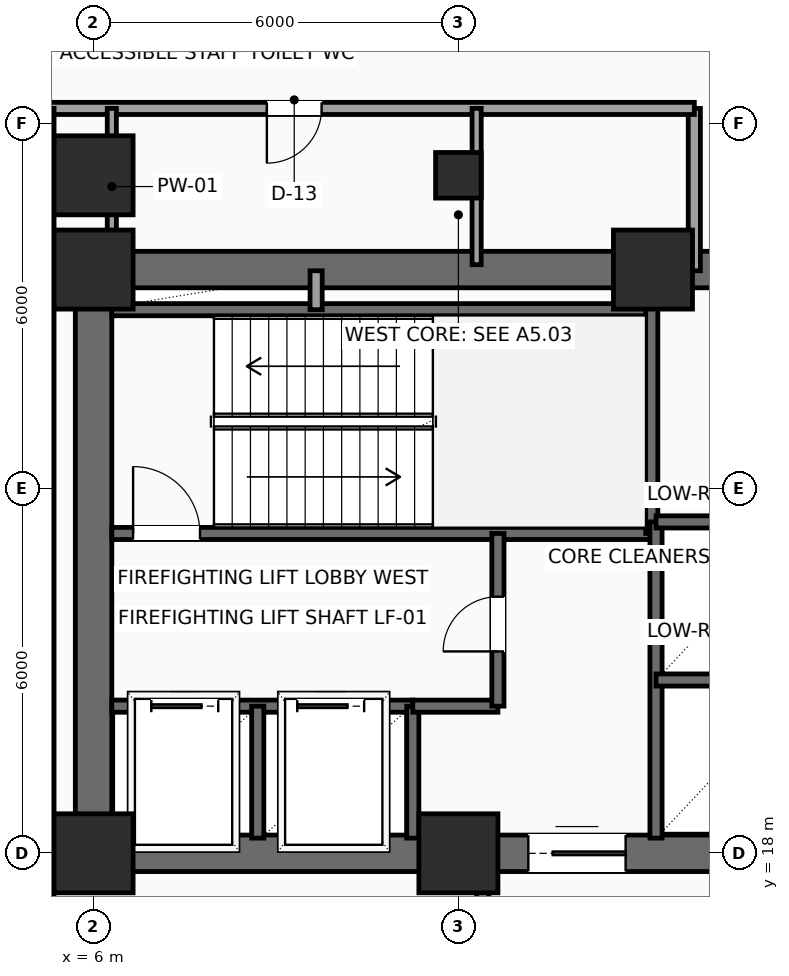
"""IFC4 building model, lengths in metres.
Left out: names, types, materials, properties, quantities, classifications, styles, units other than length and angle.
Written with IfcOpenShell. Run it as: python <this file> out.ifc"""

import sys

from ifc_helpers import new_model, si_unit, direction, frame, frame_2d, origin, origin_2d, place, context, subcontext, project, spatial, rectangle, hollow_rectangle, extrude, element, fill, save


model = new_model("IFC4")
c1 = context("Model", 3, precision=1e-05, world=origin(), true_north=direction((0.0, 1.0)))
c2 = subcontext(c1, "Body", "Model", "MODEL_VIEW")
j1 = project(units=[si_unit("LENGTHUNIT", "METRE"), si_unit("PLANEANGLEUNIT", "RADIAN")], contexts=[c1])
p1 = place(None, origin())
s1 = spatial("IfcSite", under=j1, at=p1, CompositionType="ELEMENT")
p2 = place(p1, origin())
s2 = spatial("IfcBuilding", under=s1, at=p2, CompositionType="ELEMENT")
p3 = place(p2, frame((0.0, 0.0, 55.8)))
s3 = spatial("IfcBuildingStorey", under=s2, at=p3, CompositionType="ELEMENT", Elevation=55.8)
for number, where, z_axis, x_axis in (
    (1, (6.0, 18.0, 0.0), (0.0, 0.0, 1.0), (1.0, 0.0, 0.0)),
    (2, (12.0, 18.0, 0.0), (0.0, 0.0, 1.0), (1.0, 0.0, 0.0)),
    (3, (6.0, 27.6, 0.0), (0.0, 0.0, 1.0), (1.0, 0.0, 0.0)),
    (4, (15.2, 27.6, 0.0), (0.0, 0.0, 1.0), (1.0, 0.0, 0.0)),
    (5, (6.0, 29.15, 0.0), (0.0, 0.0, 1.0), (1.0, 0.0, 0.0)),
):
    element("IfcColumn", number, at=place(p3, frame(where, z_axis=z_axis, x_axis=x_axis)), inside=s3, PredefinedType="COLUMN", context=c2, shape_type="SweptSolid", body=[
        extrude(rectangle(XDim=1.3, YDim=1.3, at=origin_2d()), origin(), (0.0, 0.0, 1.0), 3.9),
    ])
p4 = place(p3, frame((12.0, 29.15, 0.0), z_axis=(0.0, 0.0, 1.0), x_axis=(1.0, 0.0, 0.0)))
e6 = element("IfcColumn", 6, at=p4, inside=s3, PredefinedType="COLUMN", context=c2, shape_type="SweptSolid", body=[
    extrude(hollow_rectangle(XDim=0.75, YDim=0.75, WallThickness=0.035, InnerFilletRadius=0.035, OuterFilletRadius=0.05, at=origin_2d()), origin(), (0.0, 0.0, 1.0), 3.9),
])
p5 = place(p3, frame((6.0, 18.0, 0.0), z_axis=(0.0, 0.0, 1.0), x_axis=(1.0, 0.0, 0.0)))
e7 = element("IfcWall", 7, at=p5, inside=s3, PredefinedType="SHEAR", context=c2, shape_type="SweptSolid", body=[
    extrude(rectangle(XDim=12.0, YDim=0.6, at=frame_2d((6.0, 0.0))), origin(), (0.0, 0.0, 1.0), 3.65),
])
p6 = place(p5, frame((7.15, 0.0, 0.0)))
e8 = element("IfcOpeningElement", 8, at=p6, cuts=e7, PredefinedType="OPENING", context=c2, shape_type="SweptSolid", body=[
    extrude(rectangle(XDim=1.6, YDim=2.3, at=frame_2d((0.8, 1.15))), frame((0.0, 0.31, 0.0), z_axis=(0.0, -1.0, 0.0), x_axis=(1.0, 0.0, 0.0)), (0.0, 0.0, 1.0), 0.62),
])
p7 = place(p3, frame((6.0, 27.6, 0.0), z_axis=(0.0, 0.0, 1.0), x_axis=(1.0, 0.0, 0.0)))
e9 = element("IfcWall", 9, at=p7, inside=s3, PredefinedType="SHEAR", context=c2, shape_type="SweptSolid", body=[
    extrude(rectangle(XDim=12.0, YDim=0.6, at=frame_2d((6.0, 0.0))), origin(), (0.0, 0.0, 1.0), 3.65),
])
p8 = place(p7, frame((10.2, 0.0, 0.0)))
e10 = element("IfcOpeningElement", 10, at=p8, cuts=e9, PredefinedType="OPENING", context=c2, shape_type="SweptSolid", body=[
    extrude(rectangle(XDim=0.9, YDim=2.15, at=frame_2d((0.45, 1.075))), frame((0.0, 0.31, 0.0), z_axis=(0.0, -1.0, 0.0), x_axis=(1.0, 0.0, 0.0)), (0.0, 0.0, 1.0), 0.62),
])
p9 = place(p3, frame((6.0, 18.0, 0.0), z_axis=(0.0, 0.0, 1.0), x_axis=(0.0, 1.0, 0.0)))
e11 = element("IfcWall", 11, at=p9, inside=s3, PredefinedType="SHEAR", context=c2, shape_type="SweptSolid", body=[
    extrude(rectangle(XDim=9.6, YDim=0.6, at=frame_2d((4.8, 0.0))), origin(), (0.0, 0.0, 1.0), 3.65),
])
p10 = place(p3, frame((6.3, 23.26, 0.0), z_axis=(0.0, 0.0, 1.0), x_axis=(1.0, 0.0, 0.0)))
e12 = element("IfcWall", 12, at=p10, inside=s3, PredefinedType="SHEAR", context=c2, shape_type="SweptSolid", body=[
    extrude(rectangle(XDim=8.88, YDim=0.2, at=frame_2d((4.44, 0.0))), origin(), (0.0, 0.0, 1.0), 3.65),
])
p11 = place(p10, frame((0.35, 0.0, 0.0)))
e13 = element("IfcOpeningElement", 13, at=p11, cuts=e12, PredefinedType="OPENING", context=c2, shape_type="SweptSolid", body=[
    extrude(rectangle(XDim=1.1, YDim=2.2, at=frame_2d((0.55, 1.1))), frame((0.0, 0.11, 0.0), z_axis=(0.0, -1.0, 0.0), x_axis=(1.0, 0.0, 0.0)), (0.0, 0.0, 1.0), 0.22),
])
p12 = place(p3, frame((6.3, 26.94, 0.0), z_axis=(0.0, 0.0, 1.0), x_axis=(1.0, 0.0, 0.0)))
e14 = element("IfcWall", 14, at=p12, inside=s3, PredefinedType="SHEAR", context=c2, shape_type="SweptSolid", body=[
    extrude(rectangle(XDim=8.88, YDim=0.2, at=frame_2d((4.44, 0.0))), origin(), (0.0, 0.0, 1.0), 3.65),
])
p13 = place(p3, frame((15.18, 23.26, 0.0), z_axis=(0.0, 0.0, 1.0), x_axis=(0.0, 1.0, 0.0)))
e15 = element("IfcWall", 15, at=p13, inside=s3, PredefinedType="SHEAR", context=c2, shape_type="SweptSolid", body=[
    extrude(rectangle(XDim=4.04, YDim=0.2, at=frame_2d((2.02, 0.0))), origin(), (0.0, 0.0, 1.0), 3.65),
])
p14 = place(p3, frame((6.3, 20.42, 0.0), z_axis=(0.0, 0.0, 1.0), x_axis=(1.0, 0.0, 0.0)))
e16 = element("IfcWall", 16, at=p14, inside=s3, PredefinedType="SHEAR", context=c2, shape_type="SweptSolid", body=[
    extrude(rectangle(XDim=4.95, YDim=0.2, at=frame_2d((2.475, 0.0))), origin(), (0.0, 0.0, 1.0), 3.65),
])
p15 = place(p14, frame((0.65, 0.0, 0.0)))
e17 = element("IfcOpeningElement", 17, at=p15, cuts=e16, PredefinedType="OPENING", context=c2, shape_type="SweptSolid", body=[
    extrude(rectangle(XDim=1.1, YDim=2.2, at=frame_2d((0.55, 1.1))), frame((0.0, 0.11, 0.0), z_axis=(0.0, -1.0, 0.0), x_axis=(1.0, 0.0, 0.0)), (0.0, 0.0, 1.0), 0.22),
])
p16 = place(p14, frame((3.05, 0.0, 0.0)))
e18 = element("IfcOpeningElement", 18, at=p16, cuts=e16, PredefinedType="OPENING", context=c2, shape_type="SweptSolid", body=[
    extrude(rectangle(XDim=1.1, YDim=2.2, at=frame_2d((0.55, 1.1))), frame((0.0, 0.11, 0.0), z_axis=(0.0, -1.0, 0.0), x_axis=(1.0, 0.0, 0.0)), (0.0, 0.0, 1.0), 0.22),
])
for number, where, z_axis, x_axis in (
    (19, (8.7, 18.25, 0.0), (0.0, 0.0, 1.0), (0.0, 1.0, 0.0)),
    (20, (11.25, 18.25, 0.0), (0.0, 0.0, 1.0), (0.0, 1.0, 0.0)),
):
    element("IfcWall", number, at=place(p3, frame(where, z_axis=z_axis, x_axis=x_axis)), inside=s3, PredefinedType="SHEAR", context=c2, shape_type="SweptSolid", body=[
        extrude(rectangle(XDim=2.17, YDim=0.2, at=frame_2d((1.085, 0.0))), origin(), (0.0, 0.0, 1.0), 3.65),
    ])
p17 = place(p3, frame((11.25, 20.42, 0.0), z_axis=(0.0, 0.0, 1.0), x_axis=(1.0, 0.0, 0.0)))
e21 = element("IfcWall", 21, at=p17, inside=s3, PredefinedType="SHEAR", context=c2, shape_type="SweptSolid", body=[
    extrude(rectangle(XDim=1.4, YDim=0.2, at=frame_2d((0.7, 0.0))), origin(), (0.0, 0.0, 1.0), 3.65),
])
p18 = place(p3, frame((12.65, 20.42, 0.0), z_axis=(0.0, 0.0, 1.0), x_axis=(0.0, 1.0, 0.0)))
e22 = element("IfcWall", 22, at=p18, inside=s3, PredefinedType="SHEAR", context=c2, shape_type="SweptSolid", body=[
    extrude(rectangle(XDim=2.84, YDim=0.2, at=frame_2d((1.42, 0.0))), origin(), (0.0, 0.0, 1.0), 3.65),
])
p19 = place(p18, frame((0.9, 0.0, 0.0)))
e23 = element("IfcOpeningElement", 23, at=p19, cuts=e22, PredefinedType="OPENING", context=c2, shape_type="SweptSolid", body=[
    extrude(rectangle(XDim=0.9, YDim=2.15, at=frame_2d((0.45, 1.075))), frame((0.0, 0.11, 0.0), z_axis=(0.0, -1.0, 0.0), x_axis=(1.0, 0.0, 0.0)), (0.0, 0.0, 1.0), 0.22),
])
p20 = place(p3, frame((9.66, 26.94, 0.0), z_axis=(0.0, 0.0, 1.0), x_axis=(0.0, 1.0, 0.0)))
e24 = element("IfcWall", 24, at=p20, inside=s3, PredefinedType="SOLIDWALL", context=c2, shape_type="SweptSolid", body=[
    extrude(rectangle(XDim=0.64, YDim=0.2, at=frame_2d((0.32, 0.0))), origin(), (0.0, 0.0, 1.0), 3.65),
])
p21 = place(p3, frame((15.25, 18.25, 0.0), z_axis=(0.0, 0.0, 1.0), x_axis=(0.0, 1.0, 0.0)))
e25 = element("IfcWall", 25, at=p21, inside=s3, PredefinedType="SHEAR", context=c2, shape_type="SweptSolid", body=[
    extrude(rectangle(XDim=5.2, YDim=0.2, at=frame_2d((2.6, 0.0))), origin(), (0.0, 0.0, 1.0), 3.65),
])
p22 = place(p3, frame((15.25, 20.85, 0.0), z_axis=(0.0, 0.0, 1.0), x_axis=(1.0, 0.0, 0.0)))
e26 = element("IfcWall", 26, at=p22, inside=s3, PredefinedType="SHEAR", context=c2, shape_type="SweptSolid", body=[
    extrude(rectangle(XDim=2.4, YDim=0.2, at=frame_2d((1.2, 0.0))), origin(), (0.0, 0.0, 1.0), 3.65),
])
p23 = place(p3, frame((15.25, 23.45, 0.0), z_axis=(0.0, 0.0, 1.0), x_axis=(1.0, 0.0, 0.0)))
e27 = element("IfcWall", 27, at=p23, inside=s3, PredefinedType="SHEAR", context=c2, shape_type="SweptSolid", body=[
    extrude(rectangle(XDim=2.45, YDim=0.2, at=frame_2d((1.225, 0.0))), origin(), (0.0, 0.0, 1.0), 3.65),
])
p24 = place(p3, frame((15.88, 27.58, 0.0), z_axis=(0.0, 0.0, 1.0), x_axis=(0.0, 1.0, 0.0)))
e28 = element("IfcWall", 28, at=p24, inside=s3, PredefinedType="SOLIDWALL", context=c2, shape_type="SweptSolid", body=[
    extrude(rectangle(XDim=2.67, YDim=0.2, at=frame_2d((1.335, 0.0))), origin(), (0.0, 0.0, 1.0), 3.65),
])
p25 = place(p3, frame((15.88, 30.25, 0.0), z_axis=(0.0, 0.0, 1.0), x_axis=(-1.0, 0.0, 0.0)))
e29 = element("IfcWall", 29, at=p25, inside=s3, PredefinedType="SOLIDWALL", context=c2, shape_type="SweptSolid", body=[
    extrude(rectangle(XDim=10.63, YDim=0.2, at=frame_2d((5.315, 0.0))), origin(), (0.0, 0.0, 1.0), 3.65),
])
p26 = place(p25, frame((6.13, 0.0, 0.0)))
e30 = element("IfcOpeningElement", 30, at=p26, cuts=e29, PredefinedType="OPENING", context=c2, shape_type="SweptSolid", body=[
    extrude(rectangle(XDim=0.9, YDim=2.1, at=frame_2d((0.45, 1.05))), frame((0.0, 0.11, 0.0), z_axis=(0.0, -1.0, 0.0), x_axis=(1.0, 0.0, 0.0)), (0.0, 0.0, 1.0), 0.22),
])
p27 = place(p3, frame((5.25, 30.25, 0.0), z_axis=(0.0, 0.0, 1.0), x_axis=(0.0, -1.0, 0.0)))
e31 = element("IfcWall", 31, at=p27, inside=s3, PredefinedType="SOLIDWALL", context=c2, shape_type="SweptSolid", body=[
    extrude(rectangle(XDim=14.1, YDim=0.2, at=frame_2d((7.05, 0.0))), origin(), (0.0, 0.0, 1.0), 3.65),
])
p28 = place(p3, frame((12.4, 16.15, 0.0), z_axis=(0.0, 0.0, 1.0), x_axis=(0.0, 1.0, 0.0)))
e32 = element("IfcWall", 32, at=p28, inside=s3, PredefinedType="SOLIDWALL", context=c2, shape_type="SweptSolid", body=[
    extrude(rectangle(XDim=1.8, YDim=0.2, at=frame_2d((0.9, 0.0))), origin(), (0.0, 0.0, 1.0), 3.65),
])
for number, where, z_axis, x_axis in (
    (33, (6.3, 27.68, 0.0), (0.0, 0.0, 1.0), (0.0, 1.0, 0.0)),
    (34, (12.3, 27.68, 0.0), (0.0, 0.0, 1.0), (0.0, 1.0, 0.0)),
):
    element("IfcWall", number, at=place(p3, frame(where, z_axis=z_axis, x_axis=x_axis)), inside=s3, PredefinedType="PARTITIONING", context=c2, shape_type="SweptSolid", body=[
        extrude(rectangle(XDim=2.57, YDim=0.15, at=frame_2d((1.285, 0.0))), origin(), (0.0, 0.0, 1.0), 2.992),
    ])
p29 = place(p6, origin())
e35 = element("IfcDoor", 35, at=p29, inside=s3, OperationType="DOUBLE_DOOR_SLIDING", PredefinedType="DOOR", context=c2, shape_type="SweptSolid", body=[
    extrude(rectangle(XDim=1.6, YDim=2.3, at=frame_2d((0.8, 1.15))), frame((0.0, 0.025, 0.0), z_axis=(0.0, -1.0, 0.0), x_axis=(1.0, 0.0, 0.0)), (0.0, 0.0, 1.0), 0.05),
])
fill(e8, e35)
p30 = place(p11, origin())
e36 = element("IfcDoor", 36, at=p30, inside=s3, OperationType="SINGLE_SWING_LEFT", PredefinedType="DOOR", context=c2, shape_type="SweptSolid", body=[
    extrude(rectangle(XDim=1.1, YDim=2.2, at=frame_2d((0.55, 1.1))), frame((0.0, 0.025, 0.0), z_axis=(0.0, -1.0, 0.0), x_axis=(1.0, 0.0, 0.0)), (0.0, 0.0, 1.0), 0.05),
])
fill(e13, e36)
p31 = place(p15, origin())
e37 = element("IfcDoor", 37, at=p31, inside=s3, OperationType="SLIDING_TO_LEFT", PredefinedType="DOOR", context=c2, shape_type="SweptSolid", body=[
    extrude(rectangle(XDim=1.1, YDim=2.2, at=frame_2d((0.55, 1.1))), frame((0.0, 0.025, 0.0), z_axis=(0.0, -1.0, 0.0), x_axis=(1.0, 0.0, 0.0)), (0.0, 0.0, 1.0), 0.05),
])
fill(e17, e37)
p32 = place(p16, origin())
e38 = element("IfcDoor", 38, at=p32, inside=s3, OperationType="SLIDING_TO_LEFT", PredefinedType="DOOR", context=c2, shape_type="SweptSolid", body=[
    extrude(rectangle(XDim=1.1, YDim=2.2, at=frame_2d((0.55, 1.1))), frame((0.0, 0.025, 0.0), z_axis=(0.0, -1.0, 0.0), x_axis=(1.0, 0.0, 0.0)), (0.0, 0.0, 1.0), 0.05),
])
fill(e18, e38)
p33 = place(p19, origin())
e39 = element("IfcDoor", 39, at=p33, inside=s3, OperationType="SINGLE_SWING_LEFT", PredefinedType="DOOR", context=c2, shape_type="SweptSolid", body=[
    extrude(rectangle(XDim=0.9, YDim=2.15, at=frame_2d((0.45, 1.075))), frame((0.0, 0.025, 0.0), z_axis=(0.0, -1.0, 0.0), x_axis=(1.0, 0.0, 0.0)), (0.0, 0.0, 1.0), 0.05),
])
fill(e23, e39)
p34 = place(p26, origin())
e40 = element("IfcDoor", 40, at=p34, inside=s3, OperationType="SINGLE_SWING_RIGHT", PredefinedType="DOOR", context=c2, shape_type="SweptSolid", body=[
    extrude(rectangle(XDim=0.9, YDim=2.1, at=frame_2d((0.45, 1.05))), frame((0.0, 0.025, 0.0), z_axis=(0.0, -1.0, 0.0), x_axis=(1.0, 0.0, 0.0)), (0.0, 0.0, 1.0), 0.05),
])
fill(e30, e40)
save(model, sys.argv[1])
